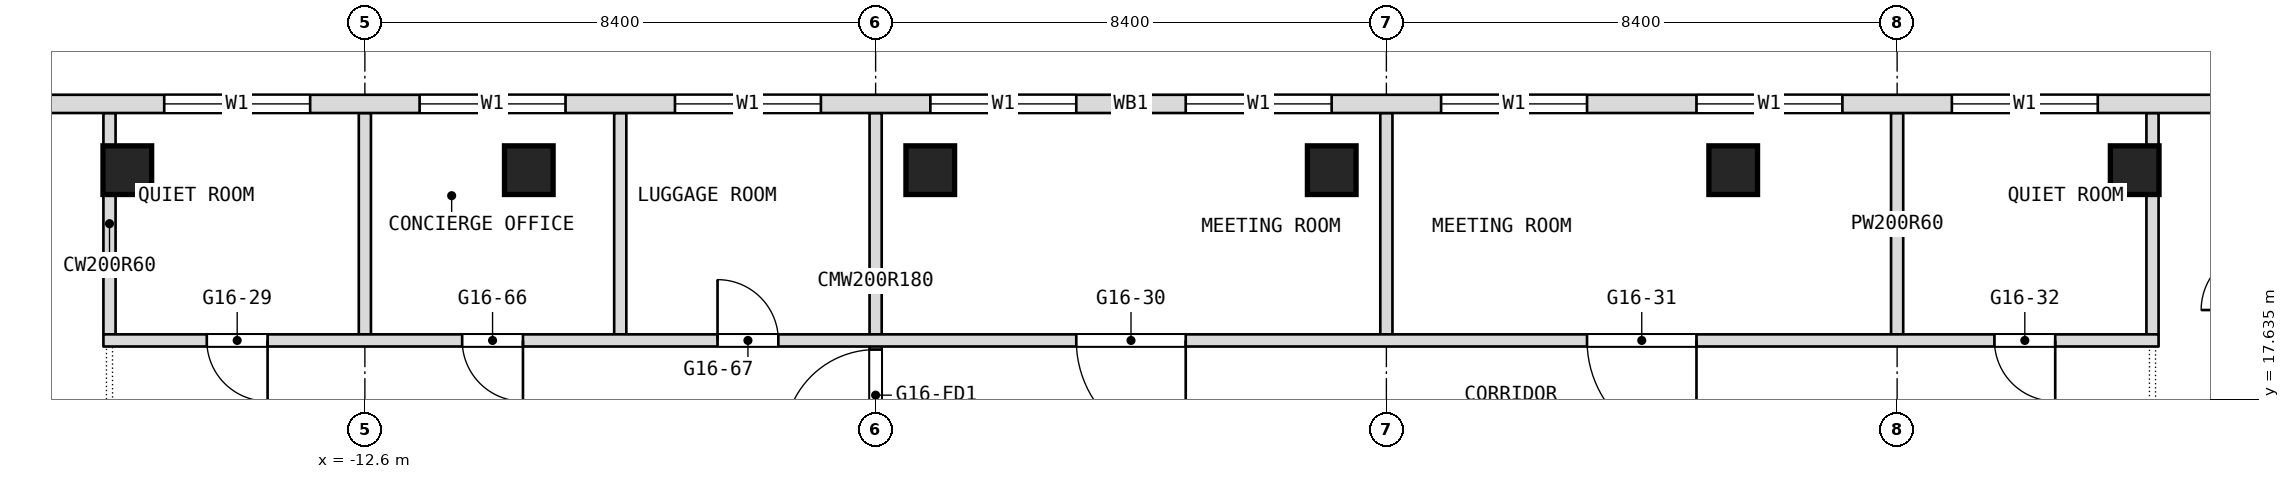
"""IFC4 building model, lengths in metres.
Left out: names, types, materials, properties, quantities, classifications, styles, units other than length and angle.
Written with IfcOpenShell. Run it as: python <this file> out.ifc"""

import sys

from ifc_helpers import new_model, si_unit, direction, frame, frame_2d, origin, origin_2d, place, context, subcontext, project, spatial, rectangle, extrude, element, fill, save


model = new_model("IFC4")
c1 = context("Model", 3, precision=1e-05, world=origin(), true_north=direction((0.0, 1.0)))
c2 = subcontext(c1, "Body", "Model", "MODEL_VIEW")
j1 = project(units=[si_unit("LENGTHUNIT", "METRE"), si_unit("PLANEANGLEUNIT", "RADIAN")], contexts=[c1])
p1 = place(None, origin())
s1 = spatial("IfcSite", under=j1, at=p1, CompositionType="ELEMENT")
p2 = place(p1, origin())
s2 = spatial("IfcBuilding", under=s1, at=p2, CompositionType="ELEMENT")
p3 = place(p2, frame((0.0, 0.0, 198.5)))
s3 = spatial("IfcBuildingStorey", under=s2, at=p3, CompositionType="ELEMENT", Elevation=198.5)
for number, where, z_axis, x_axis in (
    (1, (-16.507, 21.4, 0.0), (0.0, 0.0, 1.0), (1.0, 0.0, 0.0)),
    (2, (-9.904, 21.4, 0.0), (0.0, 0.0, 1.0), (1.0, 0.0, 0.0)),
    (3, (-3.302, 21.4, 0.0), (0.0, 0.0, 1.0), (1.0, 0.0, 0.0)),
    (4, (3.302, 21.4, 0.0), (0.0, 0.0, 1.0), (1.0, 0.0, 0.0)),
    (5, (9.904, 21.4, 0.0), (0.0, 0.0, 1.0), (1.0, 0.0, 0.0)),
    (6, (16.507, 21.4, 0.0), (0.0, 0.0, 1.0), (1.0, 0.0, 0.0)),
):
    element("IfcColumn", number, at=place(p3, frame(where, z_axis=z_axis, x_axis=x_axis)), inside=s3, PredefinedType="COLUMN", context=c2, shape_type="SweptSolid", body=[
        extrude(rectangle(XDim=0.8, YDim=0.8, at=origin_2d()), origin(), (0.0, 0.0, 1.0), 3.6),
    ])
for number, where, z_axis, x_axis in (
    (7, (16.8, 18.7, 0.0), (0.0, 0.0, 1.0), (0.0, 1.0, 0.0)),
    (8, (12.6, 18.7, 0.0), (0.0, 0.0, 1.0), (0.0, 1.0, 0.0)),
    (9, (4.2, 18.7, 0.0), (0.0, 0.0, 1.0), (0.0, 1.0, 0.0)),
):
    element("IfcWall", number, at=place(p3, frame(where, z_axis=z_axis, x_axis=x_axis)), inside=s3, PredefinedType="PARTITIONING", context=c2, shape_type="SweptSolid", body=[
        extrude(rectangle(XDim=3.64, YDim=0.2, at=frame_2d((1.82, 0.0))), origin(), (0.0, 0.0, 1.0), 3.34),
    ])
p4 = place(p3, frame((-4.2, 16.8, 0.0), z_axis=(0.0, 0.0, 1.0), x_axis=(0.0, 1.0, 0.0)))
e10 = element("IfcWall", 10, at=p4, inside=s3, PredefinedType="PARTITIONING", context=c2, shape_type="SweptSolid", body=[
    extrude(rectangle(XDim=5.54, YDim=0.2, at=frame_2d((2.77, 0.0))), origin(), (0.0, 0.0, 1.0), 3.34),
])
p5 = place(p4, frame((0.15, 0.0, 0.0)))
e11 = element("IfcOpeningElement", 11, at=p5, cuts=e10, PredefinedType="OPENING", context=c2, shape_type="SweptSolid", body=[
    extrude(rectangle(XDim=1.5, YDim=2.1, at=frame_2d((0.75, 1.05))), frame((0.0, 0.1, 0.0), z_axis=(0.0, -1.0, 0.0), x_axis=(1.0, 0.0, 0.0)), (0.0, 0.0, 1.0), 0.2),
])
for number, where, z_axis, x_axis in (
    (12, (-8.4, 18.7, 0.0), (0.0, 0.0, 1.0), (0.0, 1.0, 0.0)),
    (13, (-12.6, 18.7, 0.0), (0.0, 0.0, 1.0), (0.0, 1.0, 0.0)),
    (14, (-16.8, 18.7, 0.0), (0.0, 0.0, 1.0), (0.0, 1.0, 0.0)),
):
    element("IfcWall", number, at=place(p3, frame(where, z_axis=z_axis, x_axis=x_axis)), inside=s3, PredefinedType="PARTITIONING", context=c2, shape_type="SweptSolid", body=[
        extrude(rectangle(XDim=3.64, YDim=0.2, at=frame_2d((1.82, 0.0))), origin(), (0.0, 0.0, 1.0), 3.34),
    ])
p6 = place(p3, frame((-16.9, 18.6, 0.0), z_axis=(0.0, 0.0, 1.0), x_axis=(1.0, 0.0, 0.0)))
e15 = element("IfcWall", 15, at=p6, inside=s3, PredefinedType="PARTITIONING", context=c2, shape_type="SweptSolid", body=[
    extrude(rectangle(XDim=33.8, YDim=0.2, at=frame_2d((16.9, 0.0))), origin(), (0.0, 0.0, 1.0), 3.34),
])
p7 = place(p6, frame((1.7, 0.0, 0.0)))
e16 = element("IfcOpeningElement", 16, at=p7, cuts=e15, PredefinedType="OPENING", context=c2, shape_type="SweptSolid", body=[
    extrude(rectangle(XDim=1.0, YDim=2.1, at=frame_2d((0.5, 1.05))), frame((0.0, 0.1, 0.0), z_axis=(0.0, -1.0, 0.0), x_axis=(1.0, 0.0, 0.0)), (0.0, 0.0, 1.0), 0.2),
])
p8 = place(p6, frame((16.0, 0.0, 0.0)))
e17 = element("IfcOpeningElement", 17, at=p8, cuts=e15, PredefinedType="OPENING", context=c2, shape_type="SweptSolid", body=[
    extrude(rectangle(XDim=1.8, YDim=2.1, at=frame_2d((0.9, 1.05))), frame((0.0, 0.1, 0.0), z_axis=(0.0, -1.0, 0.0), x_axis=(1.0, 0.0, 0.0)), (0.0, 0.0, 1.0), 0.2),
])
p9 = place(p6, frame((24.4, 0.0, 0.0)))
e18 = element("IfcOpeningElement", 18, at=p9, cuts=e15, PredefinedType="OPENING", context=c2, shape_type="SweptSolid", body=[
    extrude(rectangle(XDim=1.8, YDim=2.1, at=frame_2d((0.9, 1.05))), frame((0.0, 0.1, 0.0), z_axis=(0.0, -1.0, 0.0), x_axis=(1.0, 0.0, 0.0)), (0.0, 0.0, 1.0), 0.2),
])
p10 = place(p6, frame((31.1, 0.0, 0.0)))
e19 = element("IfcOpeningElement", 19, at=p10, cuts=e15, PredefinedType="OPENING", context=c2, shape_type="SweptSolid", body=[
    extrude(rectangle(XDim=1.0, YDim=2.1, at=frame_2d((0.5, 1.05))), frame((0.0, 0.1, 0.0), z_axis=(0.0, -1.0, 0.0), x_axis=(1.0, 0.0, 0.0)), (0.0, 0.0, 1.0), 0.2),
])
p11 = place(p6, frame((5.9, 0.0, 0.0)))
e20 = element("IfcOpeningElement", 20, at=p11, cuts=e15, PredefinedType="OPENING", context=c2, shape_type="SweptSolid", body=[
    extrude(rectangle(XDim=1.0, YDim=2.1, at=frame_2d((0.5, 1.05))), frame((0.0, 0.1, 0.0), z_axis=(0.0, -1.0, 0.0), x_axis=(1.0, 0.0, 0.0)), (0.0, 0.0, 1.0), 0.2),
])
p12 = place(p6, frame((10.1, 0.0, 0.0)))
e21 = element("IfcOpeningElement", 21, at=p12, cuts=e15, PredefinedType="OPENING", context=c2, shape_type="SweptSolid", body=[
    extrude(rectangle(XDim=1.0, YDim=2.1, at=frame_2d((0.5, 1.05))), frame((0.0, 0.1, 0.0), z_axis=(0.0, -1.0, 0.0), x_axis=(1.0, 0.0, 0.0)), (0.0, 0.0, 1.0), 0.2),
])
p13 = place(p3, frame((19.206, 22.49, 0.0), z_axis=(0.0, 0.0, 1.0), x_axis=(-1.0, 0.0, 0.0)))
e22 = element("IfcWall", 22, at=p13, inside=s3, PredefinedType="NOTDEFINED", context=c2, shape_type="SweptSolid", body=[
    extrude(rectangle(XDim=38.412, YDim=0.3, at=frame_2d((19.206, 0.0))), origin(), (0.0, 0.0, 1.0), 3.6),
])
p14 = place(p13, frame((3.306, 0.0, 0.9)))
e23 = element("IfcOpeningElement", 23, at=p14, cuts=e22, PredefinedType="OPENING", context=c2, shape_type="SweptSolid", body=[
    extrude(rectangle(XDim=2.4, YDim=2.1, at=frame_2d((1.2, 1.05))), frame((0.0, 0.15, 0.0), z_axis=(0.0, -1.0, 0.0), x_axis=(1.0, 0.0, 0.0)), (0.0, 0.0, 1.0), 0.3),
])
p15 = place(p13, frame((7.506, 0.0, 0.9)))
e24 = element("IfcOpeningElement", 24, at=p15, cuts=e22, PredefinedType="OPENING", context=c2, shape_type="SweptSolid", body=[
    extrude(rectangle(XDim=2.4, YDim=2.1, at=frame_2d((1.2, 1.05))), frame((0.0, 0.15, 0.0), z_axis=(0.0, -1.0, 0.0), x_axis=(1.0, 0.0, 0.0)), (0.0, 0.0, 1.0), 0.3),
])
p16 = place(p13, frame((11.706, 0.0, 0.9)))
e25 = element("IfcOpeningElement", 25, at=p16, cuts=e22, PredefinedType="OPENING", context=c2, shape_type="SweptSolid", body=[
    extrude(rectangle(XDim=2.4, YDim=2.1, at=frame_2d((1.2, 1.05))), frame((0.0, 0.15, 0.0), z_axis=(0.0, -1.0, 0.0), x_axis=(1.0, 0.0, 0.0)), (0.0, 0.0, 1.0), 0.3),
])
p17 = place(p13, frame((15.906, 0.0, 0.9)))
e26 = element("IfcOpeningElement", 26, at=p17, cuts=e22, PredefinedType="OPENING", context=c2, shape_type="SweptSolid", body=[
    extrude(rectangle(XDim=2.4, YDim=2.1, at=frame_2d((1.2, 1.05))), frame((0.0, 0.15, 0.0), z_axis=(0.0, -1.0, 0.0), x_axis=(1.0, 0.0, 0.0)), (0.0, 0.0, 1.0), 0.3),
])
p18 = place(p13, frame((20.106, 0.0, 0.9)))
e27 = element("IfcOpeningElement", 27, at=p18, cuts=e22, PredefinedType="OPENING", context=c2, shape_type="SweptSolid", body=[
    extrude(rectangle(XDim=2.4, YDim=2.1, at=frame_2d((1.2, 1.05))), frame((0.0, 0.15, 0.0), z_axis=(0.0, -1.0, 0.0), x_axis=(1.0, 0.0, 0.0)), (0.0, 0.0, 1.0), 0.3),
])
p19 = place(p13, frame((24.306, 0.0, 0.9)))
e28 = element("IfcOpeningElement", 28, at=p19, cuts=e22, PredefinedType="OPENING", context=c2, shape_type="SweptSolid", body=[
    extrude(rectangle(XDim=2.4, YDim=2.1, at=frame_2d((1.2, 1.05))), frame((0.0, 0.15, 0.0), z_axis=(0.0, -1.0, 0.0), x_axis=(1.0, 0.0, 0.0)), (0.0, 0.0, 1.0), 0.3),
])
p20 = place(p13, frame((28.506, 0.0, 0.9)))
e29 = element("IfcOpeningElement", 29, at=p20, cuts=e22, PredefinedType="OPENING", context=c2, shape_type="SweptSolid", body=[
    extrude(rectangle(XDim=2.4, YDim=2.1, at=frame_2d((1.2, 1.05))), frame((0.0, 0.15, 0.0), z_axis=(0.0, -1.0, 0.0), x_axis=(1.0, 0.0, 0.0)), (0.0, 0.0, 1.0), 0.3),
])
p21 = place(p13, frame((32.706, 0.0, 0.9)))
e30 = element("IfcOpeningElement", 30, at=p21, cuts=e22, PredefinedType="OPENING", context=c2, shape_type="SweptSolid", body=[
    extrude(rectangle(XDim=2.4, YDim=2.1, at=frame_2d((1.2, 1.05))), frame((0.0, 0.15, 0.0), z_axis=(0.0, -1.0, 0.0), x_axis=(1.0, 0.0, 0.0)), (0.0, 0.0, 1.0), 0.3),
])
p22 = place(p7, origin())
e31 = element("IfcDoor", 31, at=p22, inside=s3, OperationType="SINGLE_SWING_LEFT", PredefinedType="DOOR", context=c2, shape_type="SweptSolid", body=[
    extrude(rectangle(XDim=1.0, YDim=2.1, at=frame_2d((0.5, 1.05))), frame((0.0, 0.025, 0.0), z_axis=(0.0, -1.0, 0.0), x_axis=(1.0, 0.0, 0.0)), (0.0, 0.0, 1.0), 0.05),
])
fill(e16, e31)
p23 = place(p8, origin())
e32 = element("IfcDoor", 32, at=p23, inside=s3, OperationType="DOUBLE_DOOR_SINGLE_SWING", PredefinedType="DOOR", context=c2, shape_type="SweptSolid", body=[
    extrude(rectangle(XDim=1.8, YDim=2.1, at=frame_2d((0.9, 1.05))), frame((0.0, 0.025, 0.0), z_axis=(0.0, -1.0, 0.0), x_axis=(1.0, 0.0, 0.0)), (0.0, 0.0, 1.0), 0.05),
])
fill(e17, e32)
p24 = place(p9, origin())
e33 = element("IfcDoor", 33, at=p24, inside=s3, OperationType="DOUBLE_DOOR_SINGLE_SWING", PredefinedType="DOOR", context=c2, shape_type="SweptSolid", body=[
    extrude(rectangle(XDim=1.8, YDim=2.1, at=frame_2d((0.9, 1.05))), frame((0.0, 0.025, 0.0), z_axis=(0.0, -1.0, 0.0), x_axis=(1.0, 0.0, 0.0)), (0.0, 0.0, 1.0), 0.05),
])
fill(e18, e33)
p25 = place(p10, origin())
e34 = element("IfcDoor", 34, at=p25, inside=s3, OperationType="SINGLE_SWING_RIGHT", PredefinedType="DOOR", context=c2, shape_type="SweptSolid", body=[
    extrude(rectangle(XDim=1.0, YDim=2.1, at=frame_2d((0.5, 1.05))), frame((0.0, 0.025, 0.0), z_axis=(0.0, -1.0, 0.0), x_axis=(1.0, 0.0, 0.0)), (0.0, 0.0, 1.0), 0.05),
])
fill(e19, e34)
p26 = place(p11, origin())
e35 = element("IfcDoor", 35, at=p26, inside=s3, OperationType="SINGLE_SWING_RIGHT", PredefinedType="DOOR", context=c2, shape_type="SweptSolid", body=[
    extrude(rectangle(XDim=1.0, YDim=2.1, at=frame_2d((0.5, 1.05))), frame((0.0, 0.025, 0.0), z_axis=(0.0, -1.0, 0.0), x_axis=(1.0, 0.0, 0.0)), (0.0, 0.0, 1.0), 0.05),
])
fill(e20, e35)
p27 = place(p12, origin())
e36 = element("IfcDoor", 36, at=p27, inside=s3, OperationType="SINGLE_SWING_LEFT", PredefinedType="DOOR", context=c2, shape_type="SweptSolid", body=[
    extrude(rectangle(XDim=1.0, YDim=2.1, at=frame_2d((0.5, 1.05))), frame((0.0, 0.025, 0.0), z_axis=(0.0, -1.0, 0.0), x_axis=(1.0, 0.0, 0.0)), (0.0, 0.0, 1.0), 0.05),
])
fill(e21, e36)
p28 = place(p14, origin())
e37 = element("IfcWindow", 37, at=p28, inside=s3, PartitioningType="SINGLE_PANEL", PredefinedType="WINDOW", context=c2, shape_type="SweptSolid", body=[
    extrude(rectangle(XDim=2.4, YDim=2.1, at=frame_2d((1.2, 1.05))), frame((0.0, 0.03, 0.0), z_axis=(0.0, -1.0, 0.0), x_axis=(1.0, 0.0, 0.0)), (0.0, 0.0, 1.0), 0.06),
])
fill(e23, e37)
p29 = place(p15, origin())
e38 = element("IfcWindow", 38, at=p29, inside=s3, PartitioningType="SINGLE_PANEL", PredefinedType="WINDOW", context=c2, shape_type="SweptSolid", body=[
    extrude(rectangle(XDim=2.4, YDim=2.1, at=frame_2d((1.2, 1.05))), frame((0.0, 0.03, 0.0), z_axis=(0.0, -1.0, 0.0), x_axis=(1.0, 0.0, 0.0)), (0.0, 0.0, 1.0), 0.06),
])
fill(e24, e38)
p30 = place(p16, origin())
e39 = element("IfcWindow", 39, at=p30, inside=s3, PartitioningType="SINGLE_PANEL", PredefinedType="WINDOW", context=c2, shape_type="SweptSolid", body=[
    extrude(rectangle(XDim=2.4, YDim=2.1, at=frame_2d((1.2, 1.05))), frame((0.0, 0.03, 0.0), z_axis=(0.0, -1.0, 0.0), x_axis=(1.0, 0.0, 0.0)), (0.0, 0.0, 1.0), 0.06),
])
fill(e25, e39)
p31 = place(p17, origin())
e40 = element("IfcWindow", 40, at=p31, inside=s3, PartitioningType="SINGLE_PANEL", PredefinedType="WINDOW", context=c2, shape_type="SweptSolid", body=[
    extrude(rectangle(XDim=2.4, YDim=2.1, at=frame_2d((1.2, 1.05))), frame((0.0, 0.03, 0.0), z_axis=(0.0, -1.0, 0.0), x_axis=(1.0, 0.0, 0.0)), (0.0, 0.0, 1.0), 0.06),
])
fill(e26, e40)
p32 = place(p18, origin())
e41 = element("IfcWindow", 41, at=p32, inside=s3, PartitioningType="SINGLE_PANEL", PredefinedType="WINDOW", context=c2, shape_type="SweptSolid", body=[
    extrude(rectangle(XDim=2.4, YDim=2.1, at=frame_2d((1.2, 1.05))), frame((0.0, 0.03, 0.0), z_axis=(0.0, -1.0, 0.0), x_axis=(1.0, 0.0, 0.0)), (0.0, 0.0, 1.0), 0.06),
])
fill(e27, e41)
p33 = place(p19, origin())
e42 = element("IfcWindow", 42, at=p33, inside=s3, PartitioningType="SINGLE_PANEL", PredefinedType="WINDOW", context=c2, shape_type="SweptSolid", body=[
    extrude(rectangle(XDim=2.4, YDim=2.1, at=frame_2d((1.2, 1.05))), frame((0.0, 0.03, 0.0), z_axis=(0.0, -1.0, 0.0), x_axis=(1.0, 0.0, 0.0)), (0.0, 0.0, 1.0), 0.06),
])
fill(e28, e42)
p34 = place(p20, origin())
e43 = element("IfcWindow", 43, at=p34, inside=s3, PartitioningType="SINGLE_PANEL", PredefinedType="WINDOW", context=c2, shape_type="SweptSolid", body=[
    extrude(rectangle(XDim=2.4, YDim=2.1, at=frame_2d((1.2, 1.05))), frame((0.0, 0.03, 0.0), z_axis=(0.0, -1.0, 0.0), x_axis=(1.0, 0.0, 0.0)), (0.0, 0.0, 1.0), 0.06),
])
fill(e29, e43)
p35 = place(p21, origin())
e44 = element("IfcWindow", 44, at=p35, inside=s3, PartitioningType="SINGLE_PANEL", PredefinedType="WINDOW", context=c2, shape_type="SweptSolid", body=[
    extrude(rectangle(XDim=2.4, YDim=2.1, at=frame_2d((1.2, 1.05))), frame((0.0, 0.03, 0.0), z_axis=(0.0, -1.0, 0.0), x_axis=(1.0, 0.0, 0.0)), (0.0, 0.0, 1.0), 0.06),
])
fill(e30, e44)
p36 = place(p5, origin())
e45 = element("IfcDoor", 45, at=p36, inside=s3, OperationType="DOUBLE_DOOR_DOUBLE_SWING", PredefinedType="DOOR", context=c2, shape_type="SweptSolid", body=[
    extrude(rectangle(XDim=1.5, YDim=2.1, at=frame_2d((0.75, 1.05))), frame((0.0, 0.025, 0.0), z_axis=(0.0, -1.0, 0.0), x_axis=(1.0, 0.0, 0.0)), (0.0, 0.0, 1.0), 0.05),
])
fill(e11, e45)
save(model, sys.argv[1])
